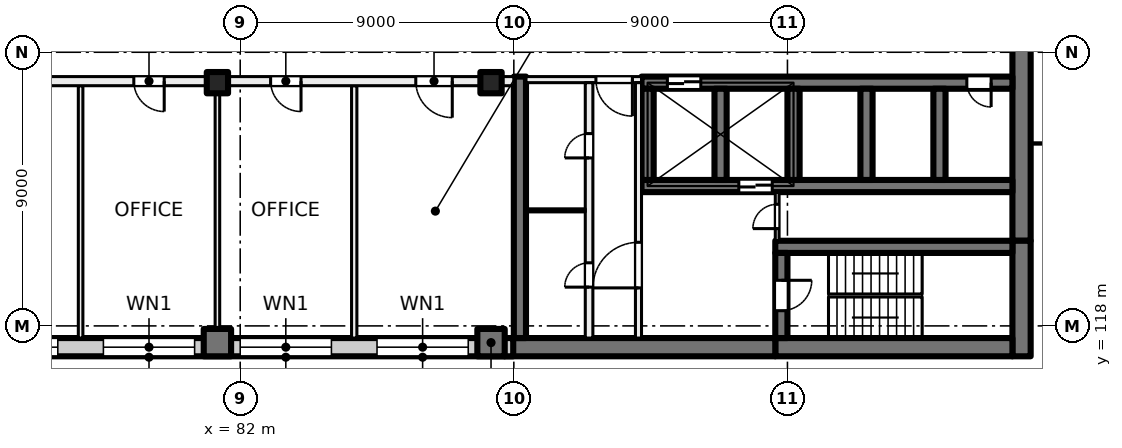
"""IFC4 building model, lengths in metres.
Left out: names, types, materials, properties, quantities, classifications, styles, units other than length and angle.
Written with IfcOpenShell. Run it as: python <this file> out.ifc"""

import sys

from ifc_helpers import new_model, si_unit, direction, frame, frame_2d, origin, origin_2d, place, context, subcontext, project, spatial, rectangle, extrude, element, fill, save


model = new_model("IFC4")
c1 = context("Model", 3, precision=1e-05, world=origin(), true_north=direction((0.0, 1.0)))
c2 = subcontext(c1, "Body", "Model", "MODEL_VIEW")
j1 = project(units=[si_unit("LENGTHUNIT", "METRE"), si_unit("PLANEANGLEUNIT", "RADIAN")], contexts=[c1])
p1 = place(None, origin())
s1 = spatial("IfcSite", under=j1, at=p1, CompositionType="ELEMENT")
p2 = place(p1, origin())
s2 = spatial("IfcBuilding", under=s1, at=p2, CompositionType="ELEMENT")
p3 = place(p2, frame((0.0, 0.0, 35.5)))
s3 = spatial("IfcBuildingStorey", under=s2, at=p3, CompositionType="ELEMENT", Elevation=35.5)
for number, where, z_axis, x_axis in (
    (1, (81.25, 126.0, 0.0), (0.0, 0.0, 1.0), (1.0, 0.0, 0.0)),
    (2, (90.25, 126.0, 0.0), (0.0, 0.0, 1.0), (1.0, 0.0, 0.0)),
):
    element("IfcColumn", number, at=place(p3, frame(where, z_axis=z_axis, x_axis=x_axis)), inside=s3, PredefinedType="COLUMN", context=c2, shape_type="SweptSolid", body=[
        extrude(rectangle(XDim=0.7, YDim=0.7, at=origin_2d()), origin(), (0.0, 0.0, 1.0), 4.0),
    ])
for number, where, z_axis, x_axis in (
    (3, (81.25, 117.45, 0.0), (0.0, 0.0, 1.0), (1.0, 0.0, 0.0)),
    (4, (90.25, 117.45, 0.0), (0.0, 0.0, 1.0), (1.0, 0.0, 0.0)),
):
    element("IfcColumn", number, at=place(p3, frame(where, z_axis=z_axis, x_axis=x_axis)), inside=s3, PredefinedType="COLUMN", context=c2, shape_type="SweptSolid", body=[
        extrude(rectangle(XDim=0.9, YDim=0.9, at=origin_2d()), origin(), (0.0, 0.0, 1.0), 4.0),
    ])
p4 = place(p3, frame((107.7, 135.2, 0.0), z_axis=(0.0, 0.0, 1.0), x_axis=(0.0, -1.0, 0.0)))
e5 = element("IfcWall", 5, at=p4, inside=s3, PredefinedType="SHEAR", context=c2, shape_type="SweptSolid", body=[
    extrude(rectangle(XDim=14.4, YDim=0.6, at=frame_2d((7.2, 0.0))), origin(), (0.0, 0.0, 1.0), 4.0),
])
p5 = place(p3, frame((107.7, 120.8, 0.0), z_axis=(0.0, 0.0, 1.0), x_axis=(0.0, -1.0, 0.0)))
e6 = element("IfcWall", 6, at=p5, inside=s3, PredefinedType="SHEAR", context=c2, shape_type="SweptSolid", body=[
    extrude(rectangle(XDim=3.8, YDim=0.6, at=frame_2d((1.9, 0.0))), origin(), (0.0, 0.0, 1.0), 4.0),
])
p6 = place(p3, frame((107.4, 117.3, 0.0), z_axis=(0.0, 0.0, 1.0), x_axis=(-1.0, 0.0, 0.0)))
e7 = element("IfcWall", 7, at=p6, inside=s3, PredefinedType="SHEAR", context=c2, shape_type="SweptSolid", body=[
    extrude(rectangle(XDim=7.8, YDim=0.6, at=frame_2d((3.9, 0.0))), origin(), (0.0, 0.0, 1.0), 4.0),
])
p7 = place(p3, frame((99.6, 117.3, 0.0), z_axis=(0.0, 0.0, 1.0), x_axis=(-1.0, 0.0, 0.0)))
e8 = element("IfcWall", 8, at=p7, inside=s3, PredefinedType="SHEAR", context=c2, shape_type="SweptSolid", body=[
    extrude(rectangle(XDim=8.9, YDim=0.6, at=frame_2d((4.45, 0.0))), origin(), (0.0, 0.0, 1.0), 4.0),
])
p8 = place(p3, frame((107.4, 120.6, 0.0), z_axis=(0.0, 0.0, 1.0), x_axis=(-1.0, 0.0, 0.0)))
e9 = element("IfcWall", 9, at=p8, inside=s3, PredefinedType="SHEAR", context=c2, shape_type="SweptSolid", body=[
    extrude(rectangle(XDim=7.8, YDim=0.4, at=frame_2d((3.9, 0.0))), origin(), (0.0, 0.0, 1.0), 4.0),
])
p9 = place(p3, frame((99.8, 120.4, 0.0), z_axis=(0.0, 0.0, 1.0), x_axis=(0.0, -1.0, 0.0)))
e10 = element("IfcWall", 10, at=p9, inside=s3, PredefinedType="SHEAR", context=c2, shape_type="SweptSolid", body=[
    extrude(rectangle(XDim=2.8, YDim=0.4, at=frame_2d((1.4, 0.0))), origin(), (0.0, 0.0, 1.0), 4.0),
])
p10 = place(p9, frame((0.9, 0.0, 0.0)))
e11 = element("IfcOpeningElement", 11, at=p10, cuts=e10, PredefinedType="OPENING", context=c2, shape_type="SweptSolid", body=[
    extrude(rectangle(XDim=1.0, YDim=2.1, at=frame_2d((0.5, 1.05))), frame((0.0, 0.21, 0.0), z_axis=(0.0, -1.0, 0.0), x_axis=(1.0, 0.0, 0.0)), (0.0, 0.0, 1.0), 0.42),
])
p11 = place(p3, frame((107.4, 126.0, 0.0), z_axis=(0.0, 0.0, 1.0), x_axis=(-1.0, 0.0, 0.0)))
e12 = element("IfcWall", 12, at=p11, inside=s3, PredefinedType="SHEAR", context=c2, shape_type="SweptSolid", body=[
    extrude(rectangle(XDim=12.2, YDim=0.4, at=frame_2d((6.1, 0.0))), origin(), (0.0, 0.0, 1.0), 4.0),
])
p12 = place(p11, frame((10.25, 0.0, 0.0)))
e13 = element("IfcOpeningElement", 13, at=p12, cuts=e12, PredefinedType="OPENING", context=c2, shape_type="SweptSolid", body=[
    extrude(rectangle(XDim=1.1, YDim=2.1, at=frame_2d((0.55, 1.05))), frame((0.0, 0.21, 0.0), z_axis=(0.0, -1.0, 0.0), x_axis=(1.0, 0.0, 0.0)), (0.0, 0.0, 1.0), 0.42),
])
p13 = place(p11, frame((0.7, 0.0, 0.0)))
e14 = element("IfcOpeningElement", 14, at=p13, cuts=e12, PredefinedType="OPENING", context=c2, shape_type="SweptSolid", body=[
    extrude(rectangle(XDim=0.8, YDim=2.1, at=frame_2d((0.4, 1.05))), frame((0.0, 0.21, 0.0), z_axis=(0.0, -1.0, 0.0), x_axis=(1.0, 0.0, 0.0)), (0.0, 0.0, 1.0), 0.42),
])
p14 = place(p3, frame((107.4, 122.6, 0.0), z_axis=(0.0, 0.0, 1.0), x_axis=(-1.0, 0.0, 0.0)))
e15 = element("IfcWall", 15, at=p14, inside=s3, PredefinedType="SHEAR", context=c2, shape_type="SweptSolid", body=[
    extrude(rectangle(XDim=12.2, YDim=0.4, at=frame_2d((6.1, 0.0))), origin(), (0.0, 0.0, 1.0), 4.0),
])
p15 = place(p14, frame((7.9, 0.0, 0.0)))
e16 = element("IfcOpeningElement", 16, at=p15, cuts=e15, PredefinedType="OPENING", context=c2, shape_type="SweptSolid", body=[
    extrude(rectangle(XDim=1.1, YDim=2.1, at=frame_2d((0.55, 1.05))), frame((0.0, 0.21, 0.0), z_axis=(0.0, -1.0, 0.0), x_axis=(1.0, 0.0, 0.0)), (0.0, 0.0, 1.0), 0.42),
])
for number, where, z_axis, x_axis in (
    (17, (105.0, 125.8, 0.0), (0.0, 0.0, 1.0), (0.0, -1.0, 0.0)),
    (18, (102.6, 125.8, 0.0), (0.0, 0.0, 1.0), (0.0, -1.0, 0.0)),
    (19, (100.2, 125.8, 0.0), (0.0, 0.0, 1.0), (0.0, -1.0, 0.0)),
    (20, (97.8, 125.8, 0.0), (0.0, 0.0, 1.0), (0.0, -1.0, 0.0)),
    (21, (95.4, 125.8, 0.0), (0.0, 0.0, 1.0), (0.0, -1.0, 0.0)),
):
    element("IfcWall", number, at=place(p3, frame(where, z_axis=z_axis, x_axis=x_axis)), inside=s3, PredefinedType="SHEAR", context=c2, shape_type="SweptSolid", body=[
        extrude(rectangle(XDim=3.0, YDim=0.4, at=frame_2d((1.5, 0.0))), origin(), (0.0, 0.0, 1.0), 4.0),
    ])
p16 = place(p3, frame((91.2, 126.2, 0.0), z_axis=(0.0, 0.0, 1.0), x_axis=(0.0, -1.0, 0.0)))
e22 = element("IfcWall", 22, at=p16, inside=s3, PredefinedType="SHEAR", context=c2, shape_type="SweptSolid", body=[
    extrude(rectangle(XDim=8.6, YDim=0.4, at=frame_2d((4.3, 0.0))), origin(), (0.0, 0.0, 1.0), 4.0),
])
p17 = place(p3, frame((90.98, 117.3, 0.0), z_axis=(0.0, 0.0, 1.0), x_axis=(-1.0, 0.0, 0.0)))
e23 = element("IfcWall", 23, at=p17, inside=s3, PredefinedType="SOLIDWALL", context=c2, shape_type="SweptSolid", body=[
    extrude(rectangle(XDim=33.745, YDim=0.6, at=frame_2d((16.873, 0.0))), origin(), (0.0, 0.0, 1.0), 3.625),
])
p18 = place(p17, frame((1.48, 0.0, 0.9)))
e24 = element("IfcOpeningElement", 24, at=p18, cuts=e23, PredefinedType="OPENING", context=c2, shape_type="SweptSolid", body=[
    extrude(rectangle(XDim=3.0, YDim=2.4, at=frame_2d((1.5, 1.2))), frame((0.0, 0.31, 0.0), z_axis=(0.0, -1.0, 0.0), x_axis=(1.0, 0.0, 0.0)), (0.0, 0.0, 1.0), 0.62),
])
p19 = place(p17, frame((5.98, 0.0, 0.9)))
e25 = element("IfcOpeningElement", 25, at=p19, cuts=e23, PredefinedType="OPENING", context=c2, shape_type="SweptSolid", body=[
    extrude(rectangle(XDim=3.0, YDim=2.4, at=frame_2d((1.5, 1.2))), frame((0.0, 0.31, 0.0), z_axis=(0.0, -1.0, 0.0), x_axis=(1.0, 0.0, 0.0)), (0.0, 0.0, 1.0), 0.62),
])
p20 = place(p17, frame((10.48, 0.0, 0.9)))
e26 = element("IfcOpeningElement", 26, at=p20, cuts=e23, PredefinedType="OPENING", context=c2, shape_type="SweptSolid", body=[
    extrude(rectangle(XDim=3.0, YDim=2.4, at=frame_2d((1.5, 1.2))), frame((0.0, 0.31, 0.0), z_axis=(0.0, -1.0, 0.0), x_axis=(1.0, 0.0, 0.0)), (0.0, 0.0, 1.0), 0.62),
])
p21 = place(p17, frame((14.98, 0.0, 0.9)))
e27 = element("IfcOpeningElement", 27, at=p21, cuts=e23, PredefinedType="OPENING", context=c2, shape_type="SweptSolid", body=[
    extrude(rectangle(XDim=3.0, YDim=2.4, at=frame_2d((1.5, 1.2))), frame((0.0, 0.31, 0.0), z_axis=(0.0, -1.0, 0.0), x_axis=(1.0, 0.0, 0.0)), (0.0, 0.0, 1.0), 0.62),
])
p22 = place(p17, frame((19.48, 0.0, 0.9)))
e28 = element("IfcOpeningElement", 28, at=p22, cuts=e23, PredefinedType="OPENING", context=c2, shape_type="SweptSolid", body=[
    extrude(rectangle(XDim=3.0, YDim=2.4, at=frame_2d((1.5, 1.2))), frame((0.0, 0.31, 0.0), z_axis=(0.0, -1.0, 0.0), x_axis=(1.0, 0.0, 0.0)), (0.0, 0.0, 1.0), 0.62),
])
p23 = place(p17, frame((23.98, 0.0, 0.9)))
e29 = element("IfcOpeningElement", 29, at=p23, cuts=e23, PredefinedType="OPENING", context=c2, shape_type="SweptSolid", body=[
    extrude(rectangle(XDim=3.0, YDim=2.4, at=frame_2d((1.5, 1.2))), frame((0.0, 0.31, 0.0), z_axis=(0.0, -1.0, 0.0), x_axis=(1.0, 0.0, 0.0)), (0.0, 0.0, 1.0), 0.62),
])
p24 = place(p17, frame((28.48, 0.0, 0.9)))
e30 = element("IfcOpeningElement", 30, at=p24, cuts=e23, PredefinedType="OPENING", context=c2, shape_type="SweptSolid", body=[
    extrude(rectangle(XDim=3.0, YDim=2.4, at=frame_2d((1.5, 1.2))), frame((0.0, 0.31, 0.0), z_axis=(0.0, -1.0, 0.0), x_axis=(1.0, 0.0, 0.0)), (0.0, 0.0, 1.0), 0.62),
])
p25 = place(p3, frame((95.2, 126.1, 0.0), z_axis=(0.0, 0.0, 1.0), x_axis=(-1.0, 0.0, 0.0)))
e31 = element("IfcWall", 31, at=p25, inside=s3, PredefinedType="PARTITIONING", context=c2, shape_type="SweptSolid", body=[
    extrude(rectangle(XDim=3.8, YDim=0.2, at=frame_2d((1.9, 0.0))), origin(), (0.0, 0.0, 1.0), 3.625),
])
p26 = place(p25, frame((0.3, 0.0, 0.0)))
e32 = element("IfcOpeningElement", 32, at=p26, cuts=e31, PredefinedType="OPENING", context=c2, shape_type="SweptSolid", body=[
    extrude(rectangle(XDim=1.2, YDim=2.1, at=frame_2d((0.6, 1.05))), frame((0.0, 0.11, 0.0), z_axis=(0.0, -1.0, 0.0), x_axis=(1.0, 0.0, 0.0)), (0.0, 0.0, 1.0), 0.22),
])
p27 = place(p3, frame((95.1, 117.6, 0.0), z_axis=(0.0, 0.0, 1.0), x_axis=(0.0, 1.0, 0.0)))
e33 = element("IfcWall", 33, at=p27, inside=s3, PredefinedType="PARTITIONING", context=c2, shape_type="SweptSolid", body=[
    extrude(rectangle(XDim=8.4, YDim=0.2, at=frame_2d((4.2, 0.0))), origin(), (0.0, 0.0, 1.0), 3.625),
])
p28 = place(p27, frame((1.65, 0.0, 0.0)))
e34 = element("IfcOpeningElement", 34, at=p28, cuts=e33, PredefinedType="OPENING", context=c2, shape_type="SweptSolid", body=[
    extrude(rectangle(XDim=1.5, YDim=2.1, at=frame_2d((0.75, 1.05))), frame((0.0, 0.11, 0.0), z_axis=(0.0, -1.0, 0.0), x_axis=(1.0, 0.0, 0.0)), (0.0, 0.0, 1.0), 0.22),
])
p29 = place(p3, frame((93.475, 117.6, 0.0), z_axis=(0.0, 0.0, 1.0), x_axis=(0.0, 1.0, 0.0)))
e35 = element("IfcWall", 35, at=p29, inside=s3, PredefinedType="PARTITIONING", context=c2, shape_type="SweptSolid", body=[
    extrude(rectangle(XDim=8.4, YDim=0.25, at=frame_2d((4.2, 0.0))), origin(), (0.0, 0.0, 1.0), 3.625),
])
p30 = place(p29, frame((5.925, 0.0, 0.0)))
e36 = element("IfcOpeningElement", 36, at=p30, cuts=e35, PredefinedType="OPENING", context=c2, shape_type="SweptSolid", body=[
    extrude(rectangle(XDim=0.8, YDim=2.1, at=frame_2d((0.4, 1.05))), frame((0.0, 0.135, 0.0), z_axis=(0.0, -1.0, 0.0), x_axis=(1.0, 0.0, 0.0)), (0.0, 0.0, 1.0), 0.27),
])
p31 = place(p29, frame((1.675, 0.0, 0.0)))
e37 = element("IfcOpeningElement", 37, at=p31, cuts=e35, PredefinedType="OPENING", context=c2, shape_type="SweptSolid", body=[
    extrude(rectangle(XDim=0.8, YDim=2.1, at=frame_2d((0.4, 1.05))), frame((0.0, 0.135, 0.0), z_axis=(0.0, -1.0, 0.0), x_axis=(1.0, 0.0, 0.0)), (0.0, 0.0, 1.0), 0.27),
])
p32 = place(p3, frame((99.663, 120.8, 0.0), z_axis=(0.0, 0.0, 1.0), x_axis=(0.0, 1.0, 0.0)))
e38 = element("IfcWall", 38, at=p32, inside=s3, PredefinedType="PARTITIONING", context=c2, shape_type="SweptSolid", body=[
    extrude(rectangle(XDim=1.6, YDim=0.125, at=frame_2d((0.8, 0.0))), origin(), (0.0, 0.0, 1.0), 3.625),
])
p33 = place(p32, frame((0.4, 0.0, 0.0)))
e39 = element("IfcOpeningElement", 39, at=p33, cuts=e38, PredefinedType="OPENING", context=c2, shape_type="SweptSolid", body=[
    extrude(rectangle(XDim=0.8, YDim=2.1, at=frame_2d((0.4, 1.05))), frame((0.0, 0.073, 0.0), z_axis=(0.0, -1.0, 0.0), x_axis=(1.0, 0.0, 0.0)), (0.0, 0.0, 1.0), 0.145),
])
p34 = place(p3, frame((93.35, 121.8, 0.0), z_axis=(0.0, 0.0, 1.0), x_axis=(-1.0, 0.0, 0.0)))
e40 = element("IfcWall", 40, at=p34, inside=s3, PredefinedType="PARTITIONING", context=c2, shape_type="SweptSolid", body=[
    extrude(rectangle(XDim=1.95, YDim=0.1, at=frame_2d((0.975, 0.0))), origin(), (0.0, 0.0, 1.0), 3.625),
])
for number, where, z_axis, x_axis in (
    (41, (76.75, 117.6, 0.0), (0.0, 0.0, 1.0), (0.0, 1.0, 0.0)),
    (42, (81.25, 117.6, 0.0), (0.0, 0.0, 1.0), (0.0, 1.0, 0.0)),
):
    element("IfcWall", number, at=place(p3, frame(where, z_axis=z_axis, x_axis=x_axis)), inside=s3, PredefinedType="PARTITIONING", context=c2, shape_type="SweptSolid", body=[
        extrude(rectangle(XDim=8.3, YDim=0.15, at=frame_2d((4.15, 0.0))), origin(), (0.0, 0.0, 1.0), 3.625),
    ])
p35 = place(p3, frame((85.75, 117.6, 0.0), z_axis=(0.0, 0.0, 1.0), x_axis=(0.0, 1.0, 0.0)))
e43 = element("IfcWall", 43, at=p35, inside=s3, PredefinedType="PARTITIONING", context=c2, shape_type="SweptSolid", body=[
    extrude(rectangle(XDim=8.3, YDim=0.175, at=frame_2d((4.15, 0.0))), origin(), (0.0, 0.0, 1.0), 3.625),
])
p36 = place(p3, frame((91.0, 126.05, 0.0), z_axis=(0.0, 0.0, 1.0), x_axis=(-1.0, 0.0, 0.0)))
e44 = element("IfcWall", 44, at=p36, inside=s3, PredefinedType="PARTITIONING", context=c2, shape_type="SweptSolid", body=[
    extrude(rectangle(XDim=43.785, YDim=0.3, at=frame_2d((21.893, 0.0))), origin(), (0.0, 0.0, 1.0), 3.625),
])
p37 = place(p36, frame((2.025, 0.0, 0.0)))
e45 = element("IfcOpeningElement", 45, at=p37, cuts=e44, PredefinedType="OPENING", context=c2, shape_type="SweptSolid", body=[
    extrude(rectangle(XDim=1.2, YDim=2.1, at=frame_2d((0.6, 1.05))), frame((0.0, 0.16, 0.0), z_axis=(0.0, -1.0, 0.0), x_axis=(1.0, 0.0, 0.0)), (0.0, 0.0, 1.0), 0.32),
])
p38 = place(p36, frame((7.0, 0.0, 0.0)))
e46 = element("IfcOpeningElement", 46, at=p38, cuts=e44, PredefinedType="OPENING", context=c2, shape_type="SweptSolid", body=[
    extrude(rectangle(XDim=1.0, YDim=2.1, at=frame_2d((0.5, 1.05))), frame((0.0, 0.16, 0.0), z_axis=(0.0, -1.0, 0.0), x_axis=(1.0, 0.0, 0.0)), (0.0, 0.0, 1.0), 0.32),
])
p39 = place(p36, frame((11.5, 0.0, 0.0)))
e47 = element("IfcOpeningElement", 47, at=p39, cuts=e44, PredefinedType="OPENING", context=c2, shape_type="SweptSolid", body=[
    extrude(rectangle(XDim=1.0, YDim=2.1, at=frame_2d((0.5, 1.05))), frame((0.0, 0.16, 0.0), z_axis=(0.0, -1.0, 0.0), x_axis=(1.0, 0.0, 0.0)), (0.0, 0.0, 1.0), 0.32),
])
p40 = place(p36, frame((16.0, 0.0, 0.0)))
e48 = element("IfcOpeningElement", 48, at=p40, cuts=e44, PredefinedType="OPENING", context=c2, shape_type="SweptSolid", body=[
    extrude(rectangle(XDim=1.0, YDim=2.1, at=frame_2d((0.5, 1.05))), frame((0.0, 0.16, 0.0), z_axis=(0.0, -1.0, 0.0), x_axis=(1.0, 0.0, 0.0)), (0.0, 0.0, 1.0), 0.32),
])
p41 = place(p36, frame((20.5, 0.0, 0.0)))
e49 = element("IfcOpeningElement", 49, at=p41, cuts=e44, PredefinedType="OPENING", context=c2, shape_type="SweptSolid", body=[
    extrude(rectangle(XDim=1.0, YDim=2.1, at=frame_2d((0.5, 1.05))), frame((0.0, 0.16, 0.0), z_axis=(0.0, -1.0, 0.0), x_axis=(1.0, 0.0, 0.0)), (0.0, 0.0, 1.0), 0.32),
])
p42 = place(p36, frame((39.296, 0.0, 0.0)))
e50 = element("IfcOpeningElement", 50, at=p42, cuts=e44, PredefinedType="OPENING", context=c2, shape_type="SweptSolid", body=[
    extrude(rectangle(XDim=1.8, YDim=2.1, at=frame_2d((0.9, 1.05))), frame((0.0, 0.16, 0.0), z_axis=(0.0, -1.0, 0.0), x_axis=(1.0, 0.0, 0.0)), (0.0, 0.0, 1.0), 0.32),
])
p43 = place(p18, origin())
e51 = element("IfcWindow", 51, at=p43, inside=s3, PartitioningType="SINGLE_PANEL", PredefinedType="WINDOW", context=c2, shape_type="SweptSolid", body=[
    extrude(rectangle(XDim=3.0, YDim=2.4, at=frame_2d((1.5, 1.2))), frame((0.0, 0.03, 0.0), z_axis=(0.0, -1.0, 0.0), x_axis=(1.0, 0.0, 0.0)), (0.0, 0.0, 1.0), 0.06),
])
fill(e24, e51)
p44 = place(p19, origin())
e52 = element("IfcWindow", 52, at=p44, inside=s3, PartitioningType="SINGLE_PANEL", PredefinedType="WINDOW", context=c2, shape_type="SweptSolid", body=[
    extrude(rectangle(XDim=3.0, YDim=2.4, at=frame_2d((1.5, 1.2))), frame((0.0, 0.03, 0.0), z_axis=(0.0, -1.0, 0.0), x_axis=(1.0, 0.0, 0.0)), (0.0, 0.0, 1.0), 0.06),
])
fill(e25, e52)
p45 = place(p20, origin())
e53 = element("IfcWindow", 53, at=p45, inside=s3, PartitioningType="SINGLE_PANEL", PredefinedType="WINDOW", context=c2, shape_type="SweptSolid", body=[
    extrude(rectangle(XDim=3.0, YDim=2.4, at=frame_2d((1.5, 1.2))), frame((0.0, 0.03, 0.0), z_axis=(0.0, -1.0, 0.0), x_axis=(1.0, 0.0, 0.0)), (0.0, 0.0, 1.0), 0.06),
])
fill(e26, e53)
p46 = place(p21, origin())
e54 = element("IfcWindow", 54, at=p46, inside=s3, PartitioningType="SINGLE_PANEL", PredefinedType="WINDOW", context=c2, shape_type="SweptSolid", body=[
    extrude(rectangle(XDim=3.0, YDim=2.4, at=frame_2d((1.5, 1.2))), frame((0.0, 0.03, 0.0), z_axis=(0.0, -1.0, 0.0), x_axis=(1.0, 0.0, 0.0)), (0.0, 0.0, 1.0), 0.06),
])
fill(e27, e54)
p47 = place(p12, origin())
e55 = element("IfcDoor", 55, at=p47, inside=s3, OperationType="DOUBLE_DOOR_SLIDING", PredefinedType="DOOR", context=c2, shape_type="SweptSolid", body=[
    extrude(rectangle(XDim=1.1, YDim=2.1, at=frame_2d((0.55, 1.05))), frame((0.0, 0.025, 0.0), z_axis=(0.0, -1.0, 0.0), x_axis=(1.0, 0.0, 0.0)), (0.0, 0.0, 1.0), 0.05),
])
fill(e13, e55)
p48 = place(p13, origin())
e56 = element("IfcDoor", 56, at=p48, inside=s3, OperationType="SINGLE_SWING_LEFT", PredefinedType="DOOR", context=c2, shape_type="SweptSolid", body=[
    extrude(rectangle(XDim=0.8, YDim=2.1, at=frame_2d((0.4, 1.05))), frame((0.0, 0.025, 0.0), z_axis=(0.0, -1.0, 0.0), x_axis=(1.0, 0.0, 0.0)), (0.0, 0.0, 1.0), 0.05),
])
fill(e14, e56)
p49 = place(p26, origin())
e57 = element("IfcDoor", 57, at=p49, inside=s3, OperationType="DOUBLE_DOOR_SINGLE_SWING", PredefinedType="DOOR", context=c2, shape_type="SweptSolid", body=[
    extrude(rectangle(XDim=1.2, YDim=2.1, at=frame_2d((0.6, 1.05))), frame((0.0, 0.025, 0.0), z_axis=(0.0, -1.0, 0.0), x_axis=(1.0, 0.0, 0.0)), (0.0, 0.0, 1.0), 0.05),
])
fill(e32, e57)
p50 = place(p28, origin())
e58 = element("IfcDoor", 58, at=p50, inside=s3, OperationType="DOUBLE_DOOR_SINGLE_SWING", PredefinedType="DOOR", context=c2, shape_type="SweptSolid", body=[
    extrude(rectangle(XDim=1.5, YDim=2.1, at=frame_2d((0.75, 1.05))), frame((0.0, 0.025, 0.0), z_axis=(0.0, -1.0, 0.0), x_axis=(1.0, 0.0, 0.0)), (0.0, 0.0, 1.0), 0.05),
])
fill(e34, e58)
p51 = place(p10, origin())
e59 = element("IfcDoor", 59, at=p51, inside=s3, OperationType="SINGLE_SWING_LEFT", PredefinedType="DOOR", context=c2, shape_type="SweptSolid", body=[
    extrude(rectangle(XDim=1.0, YDim=2.1, at=frame_2d((0.5, 1.05))), frame((0.0, 0.025, 0.0), z_axis=(0.0, -1.0, 0.0), x_axis=(1.0, 0.0, 0.0)), (0.0, 0.0, 1.0), 0.05),
])
fill(e11, e59)
p52 = place(p33, origin())
e60 = element("IfcDoor", 60, at=p52, inside=s3, OperationType="SINGLE_SWING_RIGHT", PredefinedType="DOOR", context=c2, shape_type="SweptSolid", body=[
    extrude(rectangle(XDim=0.8, YDim=2.1, at=frame_2d((0.4, 1.05))), frame((0.0, 0.025, 0.0), z_axis=(0.0, -1.0, 0.0), x_axis=(1.0, 0.0, 0.0)), (0.0, 0.0, 1.0), 0.05),
])
fill(e39, e60)
p53 = place(p30, origin())
e61 = element("IfcDoor", 61, at=p53, inside=s3, OperationType="SINGLE_SWING_LEFT", PredefinedType="DOOR", context=c2, shape_type="SweptSolid", body=[
    extrude(rectangle(XDim=0.8, YDim=2.1, at=frame_2d((0.4, 1.05))), frame((0.0, 0.025, 0.0), z_axis=(0.0, -1.0, 0.0), x_axis=(1.0, 0.0, 0.0)), (0.0, 0.0, 1.0), 0.05),
])
fill(e36, e61)
p54 = place(p31, origin())
e62 = element("IfcDoor", 62, at=p54, inside=s3, OperationType="SINGLE_SWING_RIGHT", PredefinedType="DOOR", context=c2, shape_type="SweptSolid", body=[
    extrude(rectangle(XDim=0.8, YDim=2.1, at=frame_2d((0.4, 1.05))), frame((0.0, 0.025, 0.0), z_axis=(0.0, -1.0, 0.0), x_axis=(1.0, 0.0, 0.0)), (0.0, 0.0, 1.0), 0.05),
])
fill(e37, e62)
p55 = place(p15, origin())
e63 = element("IfcDoor", 63, at=p55, inside=s3, OperationType="DOUBLE_DOOR_SLIDING", PredefinedType="DOOR", context=c2, shape_type="SweptSolid", body=[
    extrude(rectangle(XDim=1.1, YDim=2.1, at=frame_2d((0.55, 1.05))), frame((0.0, 0.025, 0.0), z_axis=(0.0, -1.0, 0.0), x_axis=(1.0, 0.0, 0.0)), (0.0, 0.0, 1.0), 0.05),
])
fill(e16, e63)
p56 = place(p37, origin())
e64 = element("IfcDoor", 64, at=p56, inside=s3, OperationType="DOUBLE_DOOR_SINGLE_SWING", PredefinedType="DOOR", context=c2, shape_type="SweptSolid", body=[
    extrude(rectangle(XDim=1.2, YDim=2.1, at=frame_2d((0.6, 1.05))), frame((0.0, 0.025, 0.0), z_axis=(0.0, -1.0, 0.0), x_axis=(1.0, 0.0, 0.0)), (0.0, 0.0, 1.0), 0.05),
])
fill(e45, e64)
p57 = place(p38, origin())
e65 = element("IfcDoor", 65, at=p57, inside=s3, OperationType="SINGLE_SWING_RIGHT", PredefinedType="DOOR", context=c2, shape_type="SweptSolid", body=[
    extrude(rectangle(XDim=1.0, YDim=2.1, at=frame_2d((0.5, 1.05))), frame((0.0, 0.025, 0.0), z_axis=(0.0, -1.0, 0.0), x_axis=(1.0, 0.0, 0.0)), (0.0, 0.0, 1.0), 0.05),
])
fill(e46, e65)
p58 = place(p39, origin())
e66 = element("IfcDoor", 66, at=p58, inside=s3, OperationType="SINGLE_SWING_LEFT", PredefinedType="DOOR", context=c2, shape_type="SweptSolid", body=[
    extrude(rectangle(XDim=1.0, YDim=2.1, at=frame_2d((0.5, 1.05))), frame((0.0, 0.025, 0.0), z_axis=(0.0, -1.0, 0.0), x_axis=(1.0, 0.0, 0.0)), (0.0, 0.0, 1.0), 0.05),
])
fill(e47, e66)
save(model, sys.argv[1])
